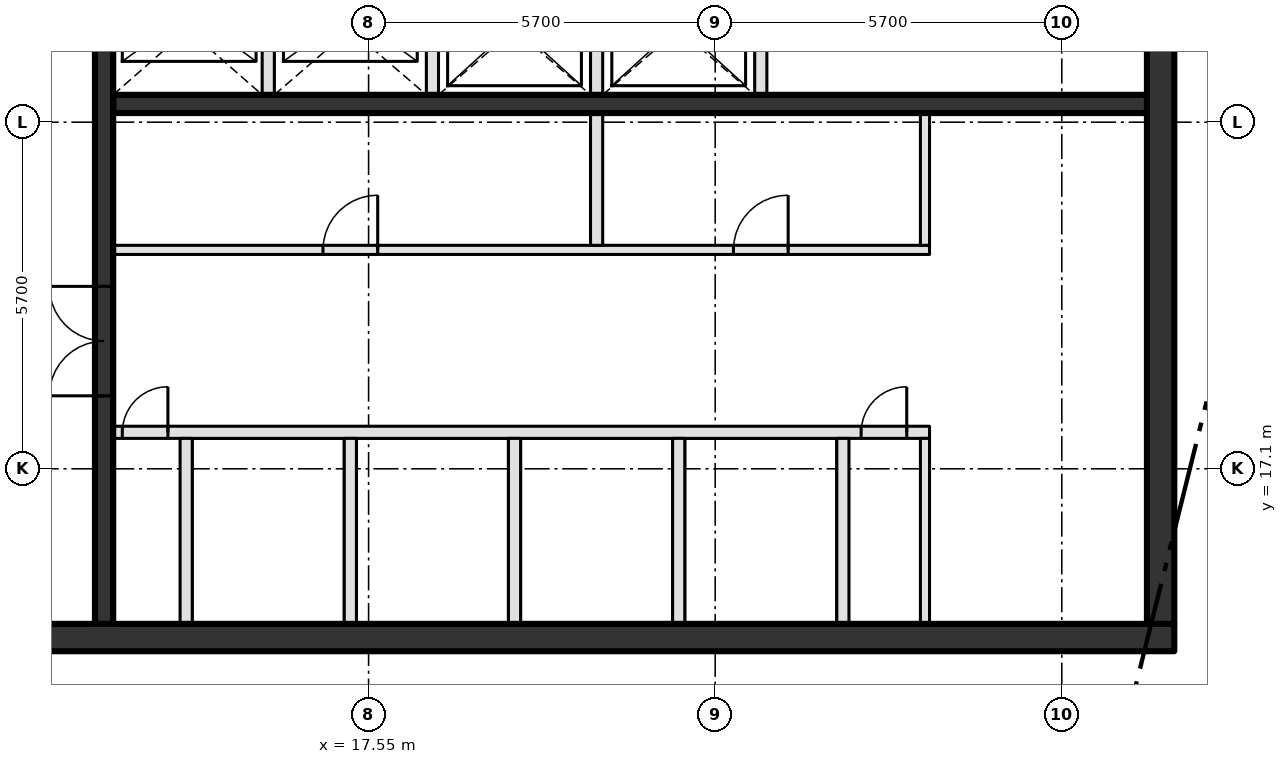
"""IFC4 building model, lengths in metres.
Left out: names, types, materials, properties, quantities, classifications, styles, units other than length and angle.
Written with IfcOpenShell. Run it as: python <this file> out.ifc"""

import sys

from ifc_helpers import new_model, si_unit, direction, frame, frame_2d, origin, place, context, subcontext, project, spatial, rectangle, extrude, element, fill, save


model = new_model("IFC4")
c1 = context("Model", 3, precision=1e-05, world=origin(), true_north=direction((0.0, 1.0)))
c2 = subcontext(c1, "Body", "Model", "MODEL_VIEW")
j1 = project(units=[si_unit("LENGTHUNIT", "METRE"), si_unit("PLANEANGLEUNIT", "RADIAN")], contexts=[c1])
p1 = place(None, origin())
s1 = spatial("IfcSite", under=j1, at=p1, CompositionType="ELEMENT")
p2 = place(p1, origin())
s2 = spatial("IfcBuilding", under=s1, at=p2, CompositionType="ELEMENT")
p3 = place(p2, frame((0.0, 0.0, 400.2)))
s3 = spatial("IfcBuildingStorey", under=s2, at=p3, CompositionType="ELEMENT", Elevation=400.2)
p4 = place(p3, frame((8.0, 14.325, -0.45), z_axis=(0.0, 0.0, 1.0), x_axis=(1.0, 0.0, 0.0)))
e1 = element("IfcWall", 1, at=p4, inside=s3, PredefinedType="SHEAR", context=c2, shape_type="SweptSolid", body=[
    extrude(rectangle(XDim=22.8, YDim=0.45, at=frame_2d((11.4, 0.0))), origin(), (0.0, 0.0, 1.0), 4.95),
])
p5 = place(p4, frame((2.3, 0.0, 0.45)))
e2 = element("IfcOpeningElement", 2, at=p5, cuts=e1, PredefinedType="OPENING", context=c2, shape_type="SweptSolid", body=[
    extrude(rectangle(XDim=1.8, YDim=2.1, at=frame_2d((0.9, 1.05))), frame((0.0, 0.235, 0.0), z_axis=(0.0, -1.0, 0.0), x_axis=(1.0, 0.0, 0.0)), (0.0, 0.0, 1.0), 0.47),
])
p6 = place(p3, frame((30.575, 14.55, -0.45), z_axis=(0.0, 0.0, 1.0), x_axis=(0.0, 1.0, 0.0)))
e3 = element("IfcWall", 3, at=p6, inside=s3, PredefinedType="SHEAR", context=c2, shape_type="SweptSolid", body=[
    extrude(rectangle(XDim=21.15, YDim=0.45, at=frame_2d((10.575, 0.0))), origin(), (0.0, 0.0, 1.0), 4.95),
])
p7 = place(p3, frame((13.35, 17.7, 0.0), z_axis=(0.0, 0.0, 1.0), x_axis=(1.0, 0.0, 0.0)))
e4 = element("IfcWall", 4, at=p7, inside=s3, PredefinedType="SOLIDWALL", context=c2, shape_type="SweptSolid", body=[
    extrude(rectangle(XDim=13.425, YDim=0.2, at=frame_2d((6.712, 0.0))), origin(), (0.0, 0.0, 1.0), 4.5),
])
p8 = place(p7, frame((0.15, 0.0, 0.0)))
e5 = element("IfcOpeningElement", 5, at=p8, cuts=e4, PredefinedType="OPENING", context=c2, shape_type="SweptSolid", body=[
    extrude(rectangle(XDim=0.75, YDim=2.1, at=frame_2d((0.375, 1.05))), frame((0.0, 0.11, 0.0), z_axis=(0.0, -1.0, 0.0), x_axis=(1.0, 0.0, 0.0)), (0.0, 0.0, 1.0), 0.22),
])
p9 = place(p7, frame((12.3, 0.0, 0.0)))
e6 = element("IfcOpeningElement", 6, at=p9, cuts=e4, PredefinedType="OPENING", context=c2, shape_type="SweptSolid", body=[
    extrude(rectangle(XDim=0.75, YDim=2.1, at=frame_2d((0.375, 1.05))), frame((0.0, 0.11, 0.0), z_axis=(0.0, -1.0, 0.0), x_axis=(1.0, 0.0, 0.0)), (0.0, 0.0, 1.0), 0.22),
])
p10 = place(p3, frame((13.35, 20.7, 0.0), z_axis=(0.0, 0.0, 1.0), x_axis=(1.0, 0.0, 0.0)))
e7 = element("IfcWall", 7, at=p10, inside=s3, PredefinedType="PARTITIONING", context=c2, shape_type="SweptSolid", body=[
    extrude(rectangle(XDim=13.425, YDim=0.15, at=frame_2d((6.712, 0.0))), origin(), (0.0, 0.0, 1.0), 4.5),
])
p11 = place(p10, frame((3.45, 0.0, 0.0)))
e8 = element("IfcOpeningElement", 8, at=p11, cuts=e7, PredefinedType="OPENING", context=c2, shape_type="SweptSolid", body=[
    extrude(rectangle(XDim=0.9, YDim=2.1, at=frame_2d((0.45, 1.05))), frame((0.0, 0.085, 0.0), z_axis=(0.0, -1.0, 0.0), x_axis=(1.0, 0.0, 0.0)), (0.0, 0.0, 1.0), 0.17),
])
p12 = place(p10, frame((10.2, 0.0, 0.0)))
e9 = element("IfcOpeningElement", 9, at=p12, cuts=e7, PredefinedType="OPENING", context=c2, shape_type="SweptSolid", body=[
    extrude(rectangle(XDim=0.9, YDim=2.1, at=frame_2d((0.45, 1.05))), frame((0.0, 0.085, 0.0), z_axis=(0.0, -1.0, 0.0), x_axis=(1.0, 0.0, 0.0)), (0.0, 0.0, 1.0), 0.17),
])
p13 = place(p3, frame((13.35, 23.1, 0.0), z_axis=(0.0, 0.0, 1.0), x_axis=(1.0, 0.0, 0.0)))
e10 = element("IfcWall", 10, at=p13, inside=s3, PredefinedType="SHEAR", context=c2, shape_type="SweptSolid", body=[
    extrude(rectangle(XDim=17.0, YDim=0.3, at=frame_2d((8.5, 0.0))), origin(), (0.0, 0.0, 1.0), 4.5),
])
p14 = place(p3, frame((13.2, 14.55, 0.0), z_axis=(0.0, 0.0, 1.0), x_axis=(0.0, 1.0, 0.0)))
e11 = element("IfcWall", 11, at=p14, inside=s3, PredefinedType="SHEAR", context=c2, shape_type="SweptSolid", body=[
    extrude(rectangle(XDim=21.15, YDim=0.3, at=frame_2d((10.575, 0.0))), origin(), (0.0, 0.0, 1.0), 4.5),
])
p15 = place(p14, frame((3.75, 0.0, 0.0)))
e12 = element("IfcOpeningElement", 12, at=p15, cuts=e11, PredefinedType="OPENING", context=c2, shape_type="SweptSolid", body=[
    extrude(rectangle(XDim=1.8, YDim=2.1, at=frame_2d((0.9, 1.05))), frame((0.0, 0.16, 0.0), z_axis=(0.0, -1.0, 0.0), x_axis=(1.0, 0.0, 0.0)), (0.0, 0.0, 1.0), 0.32),
])
p16 = place(p14, frame((11.85, 0.0, 0.0)))
e13 = element("IfcOpeningElement", 13, at=p16, cuts=e11, PredefinedType="OPENING", context=c2, shape_type="SweptSolid", body=[
    extrude(rectangle(XDim=1.2, YDim=2.1, at=frame_2d((0.6, 1.05))), frame((0.0, 0.16, 0.0), z_axis=(0.0, -1.0, 0.0), x_axis=(1.0, 0.0, 0.0)), (0.0, 0.0, 1.0), 0.32),
])
p17 = place(p3, frame((14.55, 14.55, 0.0), z_axis=(0.0, 0.0, 1.0), x_axis=(0.0, 1.0, 0.0)))
e14 = element("IfcWall", 14, at=p17, inside=s3, PredefinedType="SOLIDWALL", context=c2, shape_type="SweptSolid", body=[
    extrude(rectangle(XDim=3.05, YDim=0.2, at=frame_2d((1.525, 0.0))), origin(), (0.0, 0.0, 1.0), 4.5),
])
p18 = place(p3, frame((15.9, 23.25, 0.0), z_axis=(0.0, 0.0, 1.0), x_axis=(0.0, 1.0, 0.0)))
e15 = element("IfcWall", 15, at=p18, inside=s3, PredefinedType="SOLIDWALL", context=c2, shape_type="SweptSolid", body=[
    extrude(rectangle(XDim=2.15, YDim=0.2, at=frame_2d((1.075, 0.0))), origin(), (0.0, 0.0, 1.0), 4.5),
])
p19 = place(p3, frame((17.25, 14.55, 0.0), z_axis=(0.0, 0.0, 1.0), x_axis=(0.0, 1.0, 0.0)))
e16 = element("IfcWall", 16, at=p19, inside=s3, PredefinedType="SOLIDWALL", context=c2, shape_type="SweptSolid", body=[
    extrude(rectangle(XDim=3.05, YDim=0.2, at=frame_2d((1.525, 0.0))), origin(), (0.0, 0.0, 1.0), 4.5),
])
p20 = place(p3, frame((18.6, 23.25, 0.0), z_axis=(0.0, 0.0, 1.0), x_axis=(0.0, 1.0, 0.0)))
e17 = element("IfcWall", 17, at=p20, inside=s3, PredefinedType="SOLIDWALL", context=c2, shape_type="SweptSolid", body=[
    extrude(rectangle(XDim=5.15, YDim=0.2, at=frame_2d((2.575, 0.0))), origin(), (0.0, 0.0, 1.0), 4.5),
])
p21 = place(p20, frame((3.15, 0.0, 0.0)))
e18 = element("IfcOpeningElement", 18, at=p21, cuts=e17, PredefinedType="OPENING", context=c2, shape_type="SweptSolid", body=[
    extrude(rectangle(XDim=1.2, YDim=2.1, at=frame_2d((0.6, 1.05))), frame((0.0, 0.11, 0.0), z_axis=(0.0, -1.0, 0.0), x_axis=(1.0, 0.0, 0.0)), (0.0, 0.0, 1.0), 0.22),
])
p22 = place(p3, frame((19.95, 14.55, 0.0), z_axis=(0.0, 0.0, 1.0), x_axis=(0.0, 1.0, 0.0)))
e19 = element("IfcWall", 19, at=p22, inside=s3, PredefinedType="SOLIDWALL", context=c2, shape_type="SweptSolid", body=[
    extrude(rectangle(XDim=3.05, YDim=0.2, at=frame_2d((1.525, 0.0))), origin(), (0.0, 0.0, 1.0), 4.5),
])
p23 = place(p3, frame((21.3, 20.775, 0.0), z_axis=(0.0, 0.0, 1.0), x_axis=(0.0, 1.0, 0.0)))
e20 = element("IfcWall", 20, at=p23, inside=s3, PredefinedType="SOLIDWALL", context=c2, shape_type="SweptSolid", body=[
    extrude(rectangle(XDim=4.625, YDim=0.2, at=frame_2d((2.312, 0.0))), origin(), (0.0, 0.0, 1.0), 4.5),
])
p24 = place(p3, frame((22.65, 14.55, 0.0), z_axis=(0.0, 0.0, 1.0), x_axis=(0.0, 1.0, 0.0)))
e21 = element("IfcWall", 21, at=p24, inside=s3, PredefinedType="SOLIDWALL", context=c2, shape_type="SweptSolid", body=[
    extrude(rectangle(XDim=3.05, YDim=0.2, at=frame_2d((1.525, 0.0))), origin(), (0.0, 0.0, 1.0), 4.5),
])
p25 = place(p3, frame((24.0, 23.25, 0.0), z_axis=(0.0, 0.0, 1.0), x_axis=(0.0, 1.0, 0.0)))
e22 = element("IfcWall", 22, at=p25, inside=s3, PredefinedType="SOLIDWALL", context=c2, shape_type="SweptSolid", body=[
    extrude(rectangle(XDim=2.15, YDim=0.2, at=frame_2d((1.075, 0.0))), origin(), (0.0, 0.0, 1.0), 4.5),
])
p26 = place(p3, frame((25.35, 14.55, 0.0), z_axis=(0.0, 0.0, 1.0), x_axis=(0.0, 1.0, 0.0)))
e23 = element("IfcWall", 23, at=p26, inside=s3, PredefinedType="SOLIDWALL", context=c2, shape_type="SweptSolid", body=[
    extrude(rectangle(XDim=3.05, YDim=0.2, at=frame_2d((1.525, 0.0))), origin(), (0.0, 0.0, 1.0), 4.5),
])
p27 = place(p3, frame((26.7, 14.55, 0.0), z_axis=(0.0, 0.0, 1.0), x_axis=(0.0, 1.0, 0.0)))
e24 = element("IfcWall", 24, at=p27, inside=s3, PredefinedType="PARTITIONING", context=c2, shape_type="SweptSolid", body=[
    extrude(rectangle(XDim=3.05, YDim=0.15, at=frame_2d((1.525, 0.0))), origin(), (0.0, 0.0, 1.0), 4.5),
])
p28 = place(p3, frame((26.7, 20.775, 0.0), z_axis=(0.0, 0.0, 1.0), x_axis=(0.0, 1.0, 0.0)))
e25 = element("IfcWall", 25, at=p28, inside=s3, PredefinedType="PARTITIONING", context=c2, shape_type="SweptSolid", body=[
    extrude(rectangle(XDim=2.175, YDim=0.15, at=frame_2d((1.087, 0.0))), origin(), (0.0, 0.0, 1.0), 4.5),
])
p29 = place(p8, origin())
e26 = element("IfcDoor", 26, at=p29, inside=s3, OperationType="SINGLE_SWING_RIGHT", PredefinedType="DOOR", context=c2, shape_type="SweptSolid", body=[
    extrude(rectangle(XDim=0.75, YDim=2.1, at=frame_2d((0.375, 1.05))), frame((0.0, 0.025, 0.0), z_axis=(0.0, -1.0, 0.0), x_axis=(1.0, 0.0, 0.0)), (0.0, 0.0, 1.0), 0.05),
])
fill(e5, e26)
p30 = place(p9, origin())
e27 = element("IfcDoor", 27, at=p30, inside=s3, OperationType="SINGLE_SWING_RIGHT", PredefinedType="DOOR", context=c2, shape_type="SweptSolid", body=[
    extrude(rectangle(XDim=0.75, YDim=2.1, at=frame_2d((0.375, 1.05))), frame((0.0, 0.025, 0.0), z_axis=(0.0, -1.0, 0.0), x_axis=(1.0, 0.0, 0.0)), (0.0, 0.0, 1.0), 0.05),
])
fill(e6, e27)
p31 = place(p11, origin())
e28 = element("IfcDoor", 28, at=p31, inside=s3, OperationType="SINGLE_SWING_RIGHT", PredefinedType="DOOR", context=c2, shape_type="SweptSolid", body=[
    extrude(rectangle(XDim=0.9, YDim=2.1, at=frame_2d((0.45, 1.05))), frame((0.0, 0.025, 0.0), z_axis=(0.0, -1.0, 0.0), x_axis=(1.0, 0.0, 0.0)), (0.0, 0.0, 1.0), 0.05),
])
fill(e8, e28)
p32 = place(p12, origin())
e29 = element("IfcDoor", 29, at=p32, inside=s3, OperationType="SINGLE_SWING_RIGHT", PredefinedType="DOOR", context=c2, shape_type="SweptSolid", body=[
    extrude(rectangle(XDim=0.9, YDim=2.1, at=frame_2d((0.45, 1.05))), frame((0.0, 0.025, 0.0), z_axis=(0.0, -1.0, 0.0), x_axis=(1.0, 0.0, 0.0)), (0.0, 0.0, 1.0), 0.05),
])
fill(e9, e29)
p33 = place(p15, origin())
e30 = element("IfcDoor", 30, at=p33, inside=s3, OperationType="DOUBLE_DOOR_SINGLE_SWING", PredefinedType="DOOR", context=c2, shape_type="SweptSolid", body=[
    extrude(rectangle(XDim=1.8, YDim=2.1, at=frame_2d((0.9, 1.05))), frame((0.0, 0.025, 0.0), z_axis=(0.0, -1.0, 0.0), x_axis=(1.0, 0.0, 0.0)), (0.0, 0.0, 1.0), 0.05),
])
fill(e12, e30)
save(model, sys.argv[1])
